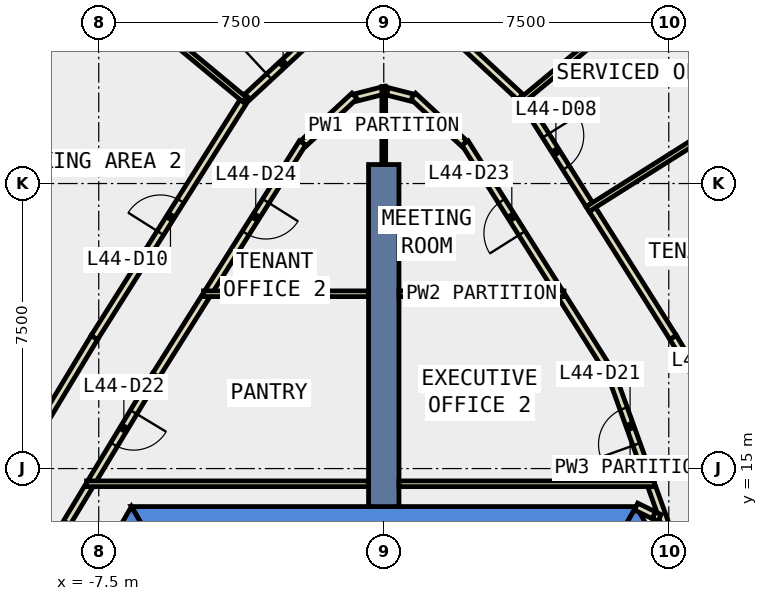
"""IFC4 building model, lengths in metres.
Left out: names, types, materials, properties, quantities, classifications, styles, units other than length and angle.
Written with IfcOpenShell. Run it as: python <this file> out.ifc"""

import sys

from ifc_helpers import new_model, si_unit, direction, frame, frame_2d, origin, place, context, subcontext, project, spatial, polyline, rectangle, outline, extrude, element, fill, save


model = new_model("IFC4")
c1 = context("Model", 3, precision=1e-05, world=origin(), true_north=direction((0.0, 1.0)))
c2 = subcontext(c1, "Body", "Model", "MODEL_VIEW")
j1 = project(units=[si_unit("LENGTHUNIT", "METRE"), si_unit("PLANEANGLEUNIT", "RADIAN")], contexts=[c1])
p1 = place(None, origin())
s1 = spatial("IfcSite", under=j1, at=p1, CompositionType="ELEMENT")
p2 = place(p1, origin())
s2 = spatial("IfcBuilding", under=s1, at=p2, CompositionType="ELEMENT")
p3 = place(p2, frame((0.0, 0.0, 198.2)))
s3 = spatial("IfcBuildingStorey", under=s2, at=p3, CompositionType="ELEMENT", Elevation=198.2)
p4 = place(p3, frame((0.0, 0.0, -0.4)))
e1 = element("IfcWall", 1, at=p4, inside=s3, PredefinedType="SHEAR", context=c2, shape_type="SweptSolid", body=[
    extrude(outline(polyline([(6.478, 12.88), (7.084, 13.23), (6.64, 14.0), (6.235, 13.3), (6.478, 12.88)])), origin(), (0.0, 0.0, 1.0), 4.2),
])
p5 = place(p3, frame((0.0, 0.0, -0.4)))
e2 = element("IfcWall", 2, at=p5, inside=s3, PredefinedType="SHEAR", context=c2, shape_type="SweptSolid", body=[
    extrude(outline(polyline([(6.64, 14.0), (-6.64, 14.0), (-6.235, 13.3), (6.235, 13.3), (6.64, 14.0)])), origin(), (0.0, 0.0, 1.0), 4.2),
])
p6 = place(p3, frame((0.0, 0.0, -0.4)))
e3 = element("IfcWall", 3, at=p6, inside=s3, PredefinedType="SHEAR", context=c2, shape_type="SweptSolid", body=[
    extrude(outline(polyline([(-11.834, 5.002), (-11.228, 4.652), (-6.235, 13.3), (-6.64, 14.0), (-11.834, 5.002)])), origin(), (0.0, 0.0, 1.0), 4.2),
])
p7 = place(p3, frame((0.0, 14.0, -0.4), z_axis=(0.0, 0.0, 1.0), x_axis=(0.0, 1.0, 0.0)))
e4 = element("IfcWall", 4, at=p7, inside=s3, PredefinedType="SHEAR", context=c2, shape_type="SweptSolid", body=[
    extrude(rectangle(XDim=9.0, YDim=0.8, at=frame_2d((4.5, 0.0))), origin(), (0.0, 0.0, 1.0), 4.2),
])
p8 = place(p3, frame((-8.394, 27.988, 0.0), z_axis=(0.0, 0.0, 1.0), x_axis=(-0.533680752529, -0.845686025887, 0.0)))
e5 = element("IfcWall", 5, at=p8, inside=s3, PredefinedType="STANDARD", context=c2, shape_type="SweptSolid", body=[
    extrude(rectangle(XDim=7.208, YDim=0.3, at=frame_2d((3.604, 0.0))), origin(), (0.0, 0.0, 1.0), 3.8),
])
p9 = place(p8, frame((0.602, 0.0, 0.9)))
e6 = element("IfcOpeningElement", 6, at=p9, cuts=e5, PredefinedType="OPENING", context=c2, shape_type="SweptSolid", body=[
    extrude(rectangle(XDim=2.4, YDim=2.6, at=frame_2d((1.2, 1.3))), frame((0.0, 0.16, 0.0), z_axis=(0.0, -1.0, 0.0), x_axis=(1.0, 0.0, 0.0)), (0.0, 0.0, 1.0), 0.32),
])
p10 = place(p8, frame((4.206, 0.0, 0.9)))
e7 = element("IfcOpeningElement", 7, at=p10, cuts=e5, PredefinedType="OPENING", context=c2, shape_type="SweptSolid", body=[
    extrude(rectangle(XDim=2.4, YDim=2.6, at=frame_2d((1.2, 1.3))), frame((0.0, 0.16, 0.0), z_axis=(0.0, -1.0, 0.0), x_axis=(1.0, 0.0, 0.0)), (0.0, 0.0, 1.0), 0.32),
])
p11 = place(p3, frame((6.64, 14.0, 0.0), z_axis=(0.0, 0.0, 1.0), x_axis=(0.899046412443, -0.437853341055, 0.0)))
e8 = element("IfcWall", 8, at=p11, inside=s3, PredefinedType="PARTITIONING", context=c2, shape_type="SweptSolid", body=[
    extrude(rectangle(XDim=0.523, YDim=0.2, at=frame_2d((0.261, 0.0))), origin(), (0.0, 0.0, 1.0), 3.8),
])
p12 = place(p3, frame((7.401, 13.552, 0.0), z_axis=(0.0, 0.0, 1.0), x_axis=(-0.337944878606, 0.941165904091, 0.0)))
e9 = element("IfcWall", 9, at=p12, inside=s3, PredefinedType="PARTITIONING", context=c2, shape_type="SweptSolid", body=[
    extrude(rectangle(XDim=1.038, YDim=0.2, at=frame_2d((0.519, 0.0))), origin(), (0.0, 0.0, 1.0), 3.8),
])
p13 = place(p3, frame((-7.759, 14.536, 0.0), z_axis=(0.0, 0.0, 1.0), x_axis=(-0.516926279395, -0.856029918678, 0.0)))
e10 = element("IfcWall", 10, at=p13, inside=s3, PredefinedType="PARTITIONING", context=c2, shape_type="SweptSolid", body=[
    extrude(rectangle(XDim=3.188, YDim=0.2, at=frame_2d((1.594, 0.0))), origin(), (0.0, 0.0, 1.0), 3.8),
])
p14 = place(p13, frame((1.094, 0.0, 0.0)))
e11 = element("IfcOpeningElement", 11, at=p14, cuts=e10, PredefinedType="OPENING", context=c2, shape_type="SweptSolid", body=[
    extrude(rectangle(XDim=1.0, YDim=2.1, at=frame_2d((0.5, 1.05))), frame((0.0, 0.11, 0.0), z_axis=(0.0, -1.0, 0.0), x_axis=(1.0, 0.0, 0.0)), (0.0, 0.0, 1.0), 0.22),
])
p15 = place(p3, frame((6.999, 14.671, 0.0), z_axis=(0.0, 0.0, 1.0), x_axis=(-0.338795881304, 0.940859899672, 0.0)))
e12 = element("IfcWall", 12, at=p15, inside=s3, PredefinedType="PARTITIONING", context=c2, shape_type="SweptSolid", body=[
    extrude(rectangle(XDim=3.055, YDim=0.2, at=frame_2d((1.527, 0.0))), origin(), (0.0, 0.0, 1.0), 3.8),
])
p16 = place(p15, frame((1.027, 0.0, 0.0)))
e13 = element("IfcOpeningElement", 13, at=p16, cuts=e12, PredefinedType="OPENING", context=c2, shape_type="SweptSolid", body=[
    extrude(rectangle(XDim=1.0, YDim=2.1, at=frame_2d((0.5, 1.05))), frame((0.0, 0.11, 0.0), z_axis=(0.0, -1.0, 0.0), x_axis=(1.0, 0.0, 0.0)), (0.0, 0.0, 1.0), 0.22),
])
p17 = place(p3, frame((5.945, 17.535, 0.0), z_axis=(0.0, 0.0, 1.0), x_axis=(-0.533581643518, 0.845748561749, 0.0)))
e14 = element("IfcWall", 14, at=p17, inside=s3, PredefinedType="PARTITIONING", context=c2, shape_type="SweptSolid", body=[
    extrude(rectangle(XDim=2.367, YDim=0.2, at=frame_2d((1.184, 0.0))), origin(), (0.0, 0.0, 1.0), 3.8),
])
p18 = place(p3, frame((-4.682, 19.537, 0.0), z_axis=(0.0, 0.0, 1.0), x_axis=(-0.533579580306, -0.845749863423, 0.0)))
e15 = element("IfcWall", 15, at=p18, inside=s3, PredefinedType="PARTITIONING", context=c2, shape_type="SweptSolid", body=[
    extrude(rectangle(XDim=2.467, YDim=0.2, at=frame_2d((1.233, 0.0))), origin(), (0.0, 0.0, 1.0), 3.8),
])
p19 = place(p3, frame((-5.998, 17.451, 0.0), z_axis=(0.0, 0.0, 1.0), x_axis=(-0.516919907997, -0.856033766108, 0.0)))
e16 = element("IfcWall", 16, at=p19, inside=s3, PredefinedType="PARTITIONING", context=c2, shape_type="SweptSolid", body=[
    extrude(rectangle(XDim=3.256, YDim=0.2, at=frame_2d((1.628, 0.0))), origin(), (0.0, 0.0, 1.0), 3.8),
])
p20 = place(p19, frame((1.128, 0.0, 0.0)))
e17 = element("IfcOpeningElement", 17, at=p20, cuts=e16, PredefinedType="OPENING", context=c2, shape_type="SweptSolid", body=[
    extrude(rectangle(XDim=1.0, YDim=2.1, at=frame_2d((0.5, 1.05))), frame((0.0, 0.11, 0.0), z_axis=(0.0, -1.0, 0.0), x_axis=(1.0, 0.0, 0.0)), (0.0, 0.0, 1.0), 0.22),
])
p21 = place(p3, frame((4.602, 19.663, 0.0), z_axis=(0.0, 0.0, 1.0), x_axis=(-0.533664968846, 0.845695986171, 0.0)))
e18 = element("IfcWall", 18, at=p21, inside=s3, PredefinedType="PARTITIONING", context=c2, shape_type="SweptSolid", body=[
    extrude(rectangle(XDim=4.621, YDim=0.2, at=frame_2d((2.311, 0.0))), origin(), (0.0, 0.0, 1.0), 3.8),
])
p22 = place(p21, frame((1.81, 0.0, 0.0)))
e19 = element("IfcOpeningElement", 19, at=p22, cuts=e18, PredefinedType="OPENING", context=c2, shape_type="SweptSolid", body=[
    extrude(rectangle(XDim=1.0, YDim=2.1, at=frame_2d((0.5, 1.05))), frame((0.0, 0.11, 0.0), z_axis=(0.0, -1.0, 0.0), x_axis=(1.0, 0.0, 0.0)), (0.0, 0.0, 1.0), 0.22),
])
p23 = place(p3, frame((2.116, 23.554, 0.0), z_axis=(0.0, 0.0, 1.0), x_axis=(-0.732722533409, 0.680527507919, 0.0)))
e20 = element("IfcWall", 20, at=p23, inside=s3, PredefinedType="PARTITIONING", context=c2, shape_type="SweptSolid", body=[
    extrude(rectangle(XDim=1.838, YDim=0.2, at=frame_2d((0.919, 0.0))), origin(), (0.0, 0.0, 1.0), 3.8),
])
p24 = place(p3, frame((0.745, 24.761, 0.0), z_axis=(0.0, 0.0, 1.0), x_axis=(-0.969081307177, 0.246741605895, 0.0)))
e21 = element("IfcWall", 21, at=p24, inside=s3, PredefinedType="PARTITIONING", context=c2, shape_type="SweptSolid", body=[
    extrude(rectangle(XDim=0.669, YDim=0.2, at=frame_2d((0.334, 0.0))), origin(), (0.0, 0.0, 1.0), 3.8),
])
p25 = place(p3, frame((0.048, 24.963, 0.0), z_axis=(0.0, 0.0, 1.0), x_axis=(-0.969098470359, -0.246674187438, 0.0)))
e22 = element("IfcWall", 22, at=p25, inside=s3, PredefinedType="PARTITIONING", context=c2, shape_type="SweptSolid", body=[
    extrude(rectangle(XDim=0.819, YDim=0.2, at=frame_2d((0.409, 0.0))), origin(), (0.0, 0.0, 1.0), 3.8),
])
p26 = place(p3, frame((-0.769, 24.805, 0.0), z_axis=(0.0, 0.0, 1.0), x_axis=(-0.732722533409, -0.680527507919, 0.0)))
e23 = element("IfcWall", 23, at=p26, inside=s3, PredefinedType="PARTITIONING", context=c2, shape_type="SweptSolid", body=[
    extrude(rectangle(XDim=1.838, YDim=0.2, at=frame_2d((0.919, 0.0))), origin(), (0.0, 0.0, 1.0), 3.8),
])
p27 = place(p3, frame((-2.136, 23.571, 0.0), z_axis=(0.0, 0.0, 1.0), x_axis=(-0.533664968846, -0.845695986171, 0.0)))
e24 = element("IfcWall", 24, at=p27, inside=s3, PredefinedType="PARTITIONING", context=c2, shape_type="SweptSolid", body=[
    extrude(rectangle(XDim=4.621, YDim=0.2, at=frame_2d((2.311, 0.0))), origin(), (0.0, 0.0, 1.0), 3.8),
])
p28 = place(p27, frame((1.81, 0.0, 0.0)))
e25 = element("IfcOpeningElement", 25, at=p28, cuts=e24, PredefinedType="OPENING", context=c2, shape_type="SweptSolid", body=[
    extrude(rectangle(XDim=1.0, YDim=2.1, at=frame_2d((0.5, 1.05))), frame((0.0, 0.11, 0.0), z_axis=(0.0, -1.0, 0.0), x_axis=(1.0, 0.0, 0.0)), (0.0, 0.0, 1.0), 0.22),
])
p29 = place(p3, frame((5.489, 21.817, 0.0), z_axis=(0.0, 0.0, 1.0), x_axis=(0.533790022325, -0.845617059943, 0.0)))
e26 = element("IfcWall", 26, at=p29, inside=s3, PredefinedType="PARTITIONING", context=c2, shape_type="SweptSolid", body=[
    extrude(rectangle(XDim=3.983, YDim=0.2, at=frame_2d((1.991, 0.0))), origin(), (0.0, 0.0, 1.0), 3.8),
])
p30 = place(p3, frame((7.615, 18.449, 0.0), z_axis=(0.0, 0.0, 1.0), x_axis=(0.516918251554, -0.856034766356, 0.0)))
e27 = element("IfcWall", 27, at=p30, inside=s3, PredefinedType="PARTITIONING", context=c2, shape_type="SweptSolid", body=[
    extrude(rectangle(XDim=3.983, YDim=0.2, at=frame_2d((1.992, 0.0))), origin(), (0.0, 0.0, 1.0), 3.8),
])
p31 = place(p30, frame((1.492, 0.0, 0.0)))
e28 = element("IfcOpeningElement", 28, at=p31, cuts=e27, PredefinedType="OPENING", context=c2, shape_type="SweptSolid", body=[
    extrude(rectangle(XDim=1.0, YDim=2.1, at=frame_2d((0.5, 1.05))), frame((0.0, 0.11, 0.0), z_axis=(0.0, -1.0, 0.0), x_axis=(1.0, 0.0, 0.0)), (0.0, 0.0, 1.0), 0.22),
])
p32 = place(p3, frame((3.65, 24.731, 0.0), z_axis=(0.0, 0.0, 1.0), x_axis=(0.533756056831, -0.845638499476, 0.0)))
e29 = element("IfcWall", 29, at=p32, inside=s3, PredefinedType="PARTITIONING", context=c2, shape_type="SweptSolid", body=[
    extrude(rectangle(XDim=3.296, YDim=0.2, at=frame_2d((1.648, 0.0))), origin(), (0.0, 0.0, 1.0), 3.8),
])
p33 = place(p32, frame((1.148, 0.0, 0.0)))
e30 = element("IfcOpeningElement", 30, at=p33, cuts=e29, PredefinedType="OPENING", context=c2, shape_type="SweptSolid", body=[
    extrude(rectangle(XDim=1.0, YDim=2.1, at=frame_2d((0.5, 1.05))), frame((0.0, 0.11, 0.0), z_axis=(0.0, -1.0, 0.0), x_axis=(1.0, 0.0, 0.0)), (0.0, 0.0, 1.0), 0.22),
])
p34 = place(p3, frame((-3.59, 24.778, 0.0), z_axis=(0.0, 0.0, 1.0), x_axis=(0.732939008525, 0.680294355248, 0.0)))
e31 = element("IfcWall", 31, at=p34, inside=s3, PredefinedType="PARTITIONING", context=c2, shape_type="SweptSolid", body=[
    extrude(rectangle(XDim=2.569, YDim=0.2, at=frame_2d((1.285, 0.0))), origin(), (0.0, 0.0, 1.0), 3.8),
])
p35 = place(p34, frame((0.785, 0.0, 0.0)))
e32 = element("IfcOpeningElement", 32, at=p35, cuts=e31, PredefinedType="OPENING", context=c2, shape_type="SweptSolid", body=[
    extrude(rectangle(XDim=1.0, YDim=2.1, at=frame_2d((0.5, 1.05))), frame((0.0, 0.11, 0.0), z_axis=(0.0, -1.0, 0.0), x_axis=(1.0, 0.0, 0.0)), (0.0, 0.0, 1.0), 0.22),
])
p36 = place(p3, frame((1.707, 26.526, 0.0), z_axis=(0.0, 0.0, 1.0), x_axis=(0.732939008525, -0.680294355248, 0.0)))
e33 = element("IfcWall", 33, at=p36, inside=s3, PredefinedType="PARTITIONING", context=c2, shape_type="SweptSolid", body=[
    extrude(rectangle(XDim=2.569, YDim=0.2, at=frame_2d((1.285, 0.0))), origin(), (0.0, 0.0, 1.0), 3.8),
])
p37 = place(p3, frame((-9.674, 15.039, 0.0), z_axis=(0.0, 0.0, 1.0), x_axis=(0.516918251554, 0.856034766356, 0.0)))
e34 = element("IfcWall", 34, at=p37, inside=s3, PredefinedType="PARTITIONING", context=c2, shape_type="SweptSolid", body=[
    extrude(rectangle(XDim=3.983, YDim=0.2, at=frame_2d((1.992, 0.0))), origin(), (0.0, 0.0, 1.0), 3.8),
])
p38 = place(p3, frame((-7.615, 18.449, 0.0), z_axis=(0.0, 0.0, 1.0), x_axis=(0.533699180497, 0.845674396406, 0.0)))
e35 = element("IfcWall", 35, at=p38, inside=s3, PredefinedType="PARTITIONING", context=c2, shape_type="SweptSolid", body=[
    extrude(rectangle(XDim=7.504, YDim=0.2, at=frame_2d((3.752, 0.0))), origin(), (0.0, 0.0, 1.0), 3.8),
])
p39 = place(p38, frame((3.252, 0.0, 0.0)))
e36 = element("IfcOpeningElement", 36, at=p39, cuts=e35, PredefinedType="OPENING", context=c2, shape_type="SweptSolid", body=[
    extrude(rectangle(XDim=1.0, YDim=2.1, at=frame_2d((0.5, 1.05))), frame((0.0, 0.11, 0.0), z_axis=(0.0, -1.0, 0.0), x_axis=(1.0, 0.0, 0.0)), (0.0, 0.0, 1.0), 0.22),
])
p40 = place(p3, frame((7.124, 14.6, 0.0), z_axis=(0.0, 0.0, 1.0), x_axis=(-1.0, 0.0, 0.0)))
e37 = element("IfcWall", 37, at=p40, inside=s3, PredefinedType="PARTITIONING", context=c2, shape_type="SweptSolid", body=[
    extrude(rectangle(XDim=6.724, YDim=0.15, at=frame_2d((3.362, 0.0))), origin(), (0.0, 0.0, 1.0), 3.8),
])
p41 = place(p3, frame((-0.4, 14.6, 0.0), z_axis=(0.0, 0.0, 1.0), x_axis=(-1.0, 0.0, 0.0)))
e38 = element("IfcWall", 38, at=p41, inside=s3, PredefinedType="PARTITIONING", context=c2, shape_type="SweptSolid", body=[
    extrude(rectangle(XDim=7.42, YDim=0.15, at=frame_2d((3.71, 0.0))), origin(), (0.0, 0.0, 1.0), 3.8),
])
for number, where, z_axis, x_axis in (
    (39, (0.4, 19.6, 0.0), (0.0, 0.0, 1.0), (1.0, 0.0, 0.0)),
    (40, (-4.742, 19.6, 0.0), (0.0, 0.0, 1.0), (1.0, 0.0, 0.0)),
):
    element("IfcWall", number, at=place(p3, frame(where, z_axis=z_axis, x_axis=x_axis)), inside=s3, PredefinedType="PARTITIONING", context=c2, shape_type="SweptSolid", body=[
        extrude(rectangle(XDim=4.342, YDim=0.15, at=frame_2d((2.171, 0.0))), origin(), (0.0, 0.0, 1.0), 3.8),
    ])
p42 = place(p3, frame((0.0, 23.0, 0.0), z_axis=(0.0, 0.0, 1.0), x_axis=(0.0, 1.0, 0.0)))
e41 = element("IfcWall", 41, at=p42, inside=s3, PredefinedType="PARTITIONING", context=c2, shape_type="SweptSolid", body=[
    extrude(rectangle(XDim=2.051, YDim=0.1, at=frame_2d((1.025, 0.0))), origin(), (0.0, 0.0, 1.0), 3.8),
])
p43 = place(p3, frame((5.364, 21.827, 0.0), z_axis=(0.0, 0.0, 1.0), x_axis=(0.845716787596, 0.533632003517, 0.0)))
e42 = element("IfcWall", 42, at=p43, inside=s3, PredefinedType="PARTITIONING", context=c2, shape_type="SweptSolid", body=[
    extrude(rectangle(XDim=5.7, YDim=0.15, at=frame_2d((2.85, 0.0))), origin(), (0.0, 0.0, 1.0), 3.8),
])
p44 = place(p3, frame((3.586, 24.646, 0.0), z_axis=(0.0, 0.0, 1.0), x_axis=(0.769538645463, 0.638600245176, 0.0)))
e43 = element("IfcWall", 43, at=p44, inside=s3, PredefinedType="PARTITIONING", context=c2, shape_type="SweptSolid", body=[
    extrude(rectangle(XDim=4.43, YDim=0.15, at=frame_2d((2.215, 0.0))), origin(), (0.0, 0.0, 1.0), 3.8),
])
p45 = place(p3, frame((-3.663, 24.71, 0.0), z_axis=(0.0, 0.0, 1.0), x_axis=(-0.76953221629, 0.638607992505, 0.0)))
e44 = element("IfcWall", 44, at=p45, inside=s3, PredefinedType="PARTITIONING", context=c2, shape_type="SweptSolid", body=[
    extrude(rectangle(XDim=4.33, YDim=0.15, at=frame_2d((2.165, 0.0))), origin(), (0.0, 0.0, 1.0), 3.8),
])
p46 = place(p3, frame((7.11, 13.771, 0.0), z_axis=(0.0, 0.0, 1.0), x_axis=(0.900120852209, -0.435640277545, 0.0)))
e45 = element("IfcWall", 45, at=p46, inside=s3, PredefinedType="PARTITIONING", context=c2, shape_type="SweptSolid", body=[
    extrude(rectangle(XDim=0.161, YDim=0.2, at=frame_2d((0.081, 0.0))), origin(), (0.0, 0.0, 1.0), 2.4),
])
p47 = place(p9, origin())
e46 = element("IfcWindow", 46, at=p47, inside=s3, PartitioningType="SINGLE_PANEL", PredefinedType="WINDOW", context=c2, shape_type="SweptSolid", body=[
    extrude(rectangle(XDim=2.4, YDim=2.6, at=frame_2d((1.2, 1.3))), frame((0.0, 0.03, 0.0), z_axis=(0.0, -1.0, 0.0), x_axis=(1.0, 0.0, 0.0)), (0.0, 0.0, 1.0), 0.06),
])
fill(e6, e46)
p48 = place(p33, origin())
e47 = element("IfcDoor", 47, at=p48, inside=s3, OperationType="SINGLE_SWING_LEFT", PredefinedType="DOOR", context=c2, shape_type="SweptSolid", body=[
    extrude(rectangle(XDim=1.0, YDim=2.1, at=frame_2d((0.5, 1.05))), frame((0.0, 0.025, 0.0), z_axis=(0.0, -1.0, 0.0), x_axis=(1.0, 0.0, 0.0)), (0.0, 0.0, 1.0), 0.05),
])
fill(e30, e47)
p49 = place(p35, origin())
e48 = element("IfcDoor", 48, at=p49, inside=s3, OperationType="SINGLE_SWING_LEFT", PredefinedType="DOOR", context=c2, shape_type="SweptSolid", body=[
    extrude(rectangle(XDim=1.0, YDim=2.1, at=frame_2d((0.5, 1.05))), frame((0.0, 0.025, 0.0), z_axis=(0.0, -1.0, 0.0), x_axis=(1.0, 0.0, 0.0)), (0.0, 0.0, 1.0), 0.05),
])
fill(e32, e48)
p50 = place(p39, origin())
e49 = element("IfcDoor", 49, at=p50, inside=s3, OperationType="SINGLE_SWING_RIGHT", PredefinedType="DOOR", context=c2, shape_type="SweptSolid", body=[
    extrude(rectangle(XDim=1.0, YDim=2.1, at=frame_2d((0.5, 1.05))), frame((0.0, 0.025, 0.0), z_axis=(0.0, -1.0, 0.0), x_axis=(1.0, 0.0, 0.0)), (0.0, 0.0, 1.0), 0.05),
])
fill(e36, e49)
p51 = place(p16, origin())
e50 = element("IfcDoor", 50, at=p51, inside=s3, OperationType="SINGLE_SWING_LEFT", PredefinedType="DOOR", context=c2, shape_type="SweptSolid", body=[
    extrude(rectangle(XDim=1.0, YDim=2.1, at=frame_2d((0.5, 1.05))), frame((0.0, 0.025, 0.0), z_axis=(0.0, -1.0, 0.0), x_axis=(1.0, 0.0, 0.0)), (0.0, 0.0, 1.0), 0.05),
])
fill(e13, e50)
p52 = place(p20, origin())
e51 = element("IfcDoor", 51, at=p52, inside=s3, OperationType="SINGLE_SWING_RIGHT", PredefinedType="DOOR", context=c2, shape_type="SweptSolid", body=[
    extrude(rectangle(XDim=1.0, YDim=2.1, at=frame_2d((0.5, 1.05))), frame((0.0, 0.025, 0.0), z_axis=(0.0, -1.0, 0.0), x_axis=(1.0, 0.0, 0.0)), (0.0, 0.0, 1.0), 0.05),
])
fill(e17, e51)
p53 = place(p22, origin())
e52 = element("IfcDoor", 52, at=p53, inside=s3, OperationType="SINGLE_SWING_LEFT", PredefinedType="DOOR", context=c2, shape_type="SweptSolid", body=[
    extrude(rectangle(XDim=1.0, YDim=2.1, at=frame_2d((0.5, 1.05))), frame((0.0, 0.025, 0.0), z_axis=(0.0, -1.0, 0.0), x_axis=(1.0, 0.0, 0.0)), (0.0, 0.0, 1.0), 0.05),
])
fill(e19, e52)
p54 = place(p28, origin())
e53 = element("IfcDoor", 53, at=p54, inside=s3, OperationType="SINGLE_SWING_LEFT", PredefinedType="DOOR", context=c2, shape_type="SweptSolid", body=[
    extrude(rectangle(XDim=1.0, YDim=2.1, at=frame_2d((0.5, 1.05))), frame((0.0, 0.025, 0.0), z_axis=(0.0, -1.0, 0.0), x_axis=(1.0, 0.0, 0.0)), (0.0, 0.0, 1.0), 0.05),
])
fill(e25, e53)
p55 = place(p14, origin())
e54 = element("IfcDoor", 54, at=p55, inside=s3, OperationType="SINGLE_SWING_LEFT", PredefinedType="DOOR", context=c2, shape_type="SweptSolid", body=[
    extrude(rectangle(XDim=1.0, YDim=2.1, at=frame_2d((0.5, 1.05))), frame((0.0, 0.025, 0.0), z_axis=(0.0, -1.0, 0.0), x_axis=(1.0, 0.0, 0.0)), (0.0, 0.0, 1.0), 0.05),
])
fill(e11, e54)
save(model, sys.argv[1])
